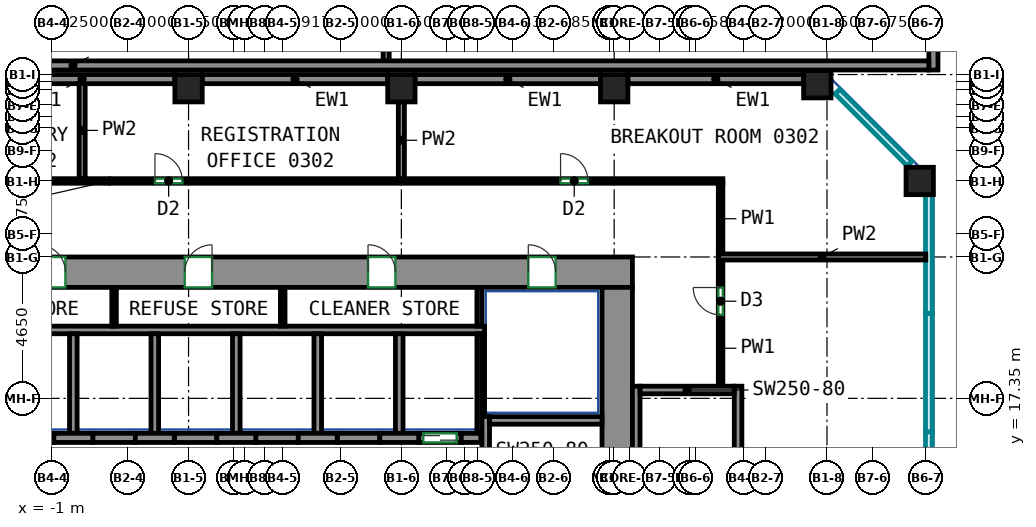
"""IFC4 building model, lengths in metres.
Left out: names, types, materials, properties, quantities, classifications, styles, units other than length and angle.
Written with IfcOpenShell. Run it as: python <this file> out.ifc"""

import sys

from ifc_helpers import new_model, si_unit, direction, frame, frame_2d, origin, origin_2d, place, context, subcontext, project, spatial, rectangle, extrude, source, transform, mapped, element, fill, save


model = new_model("IFC4")
c1 = context("Model", 3, precision=1e-05, world=origin(), true_north=direction((0.0, 1.0)))
c2 = subcontext(c1, "Body", "Model", "MODEL_VIEW")
j1 = project(units=[si_unit("LENGTHUNIT", "METRE"), si_unit("PLANEANGLEUNIT", "RADIAN")], contexts=[c1])
p1 = place(None, origin())
s1 = spatial("IfcSite", under=j1, at=p1, CompositionType="ELEMENT")
p2 = place(p1, origin())
s2 = spatial("IfcBuilding", under=s1, at=p2, CompositionType="ELEMENT")
p3 = place(p2, frame((0.0, 0.0, 18.0)))
s3 = spatial("IfcBuildingStorey", under=s2, at=p3, CompositionType="ELEMENT", Elevation=18.0)
m1 = source(origin(), c2, "Body", "SweptSolid", [
    extrude(rectangle(XDim=0.9, YDim=0.9, at=origin_2d()), origin(), (0.0, 0.0, 1.0), 4.1),
])
for number, where, z_axis, x_axis in (
    (1, (3.5, 27.55, 0.0), (0.0, 0.0, 1.0), (1.0, 0.0, 0.0)),
    (2, (10.5, 27.55, 0.0), (0.0, 0.0, 1.0), (1.0, 0.0, 0.0)),
    (3, (17.5, 27.55, 0.0), (0.0, 0.0, 1.0), (1.0, 0.0, 0.0)),
    (4, (24.182, 27.682, 0.0), (0.0, 0.0, 1.0), (1.0, 0.0, 0.0)),
    (5, (27.55, 24.5, 0.0), (0.0, 0.0, 1.0), (1.0, 0.0, 0.0)),
):
    element("IfcColumn", number, at=place(p3, frame(where, z_axis=z_axis, x_axis=x_axis)), inside=s3, PredefinedType="COLUMN", context=c2, shape_type="MappedRepresentation", body=[
        mapped(m1, transform((0.0, 0.0, 0.0))),
    ])
m2 = source(origin(), c2, "Body", "SweptSolid", [
    extrude(rectangle(XDim=34.1, YDim=1.0, at=frame_2d((17.05, 0.0))), origin(), (0.0, 0.0, 1.0), 4.1),
])
p4 = place(p3, frame((-16.0, 21.5, 0.0), z_axis=(0.0, 0.0, 1.0), x_axis=(1.0, 0.0, 0.0)))
e6 = element("IfcWall", 6, at=p4, inside=s3, PredefinedType="SHEAR", context=c2, shape_type="MappedRepresentation", body=[
    mapped(m2, transform((0.0, 0.0, 0.0))),
])
p5 = place(p4, frame((8.52, 0.0, 0.0)))
e7 = element("IfcOpeningElement", 7, at=p5, cuts=e6, PredefinedType="OPENING", context=c2, shape_type="SweptSolid", body=[
    extrude(rectangle(XDim=0.9, YDim=2.1, at=frame_2d((0.45, 1.05))), frame((0.0, 0.51, 0.0), z_axis=(0.0, -1.0, 0.0), x_axis=(1.0, 0.0, 0.0)), (0.0, 0.0, 1.0), 1.02),
])
p6 = place(p4, frame((14.55, 0.0, 0.0)))
e8 = element("IfcOpeningElement", 8, at=p6, cuts=e6, PredefinedType="OPENING", context=c2, shape_type="SweptSolid", body=[
    extrude(rectangle(XDim=0.9, YDim=2.1, at=frame_2d((0.45, 1.05))), frame((0.0, 0.51, 0.0), z_axis=(0.0, -1.0, 0.0), x_axis=(1.0, 0.0, 0.0)), (0.0, 0.0, 1.0), 1.02),
])
p7 = place(p4, frame((19.374, 0.0, 0.0)))
e9 = element("IfcOpeningElement", 9, at=p7, cuts=e6, PredefinedType="OPENING", context=c2, shape_type="SweptSolid", body=[
    extrude(rectangle(XDim=0.9, YDim=2.1, at=frame_2d((0.45, 1.05))), frame((0.0, 0.51, 0.0), z_axis=(0.0, -1.0, 0.0), x_axis=(1.0, 0.0, 0.0)), (0.0, 0.0, 1.0), 1.02),
])
p8 = place(p4, frame((25.404, 0.0, 0.0)))
e10 = element("IfcOpeningElement", 10, at=p8, cuts=e6, PredefinedType="OPENING", context=c2, shape_type="SweptSolid", body=[
    extrude(rectangle(XDim=0.9, YDim=2.1, at=frame_2d((0.45, 1.05))), frame((0.0, 0.51, 0.0), z_axis=(0.0, -1.0, 0.0), x_axis=(1.0, 0.0, 0.0)), (0.0, 0.0, 1.0), 1.02),
])
p9 = place(p4, frame((2.525, 0.0, 0.0)))
e11 = element("IfcOpeningElement", 11, at=p9, cuts=e6, PredefinedType="OPENING", context=c2, shape_type="SweptSolid", body=[
    extrude(rectangle(XDim=0.9, YDim=2.1, at=frame_2d((0.45, 1.05))), frame((0.0, 0.51, 0.0), z_axis=(0.0, -1.0, 0.0), x_axis=(1.0, 0.0, 0.0)), (0.0, 0.0, 1.0), 1.02),
])
p10 = place(p4, frame((30.675, 0.0, 0.0)))
e12 = element("IfcOpeningElement", 12, at=p10, cuts=e6, PredefinedType="OPENING", context=c2, shape_type="SweptSolid", body=[
    extrude(rectangle(XDim=0.9, YDim=2.1, at=frame_2d((0.45, 1.05))), frame((0.0, 0.51, 0.0), z_axis=(0.0, -1.0, 0.0), x_axis=(1.0, 0.0, 0.0)), (0.0, 0.0, 1.0), 1.02),
])
m3 = source(origin(), c2, "Body", "SweptSolid", [
    extrude(rectangle(XDim=12.0, YDim=1.0, at=frame_2d((6.0, 0.0))), origin(), (0.0, 0.0, 1.0), 4.1),
])
p11 = place(p3, frame((17.6, 9.0, 0.0), z_axis=(0.0, 0.0, 1.0), x_axis=(0.0, 1.0, 0.0)))
e13 = element("IfcWall", 13, at=p11, inside=s3, PredefinedType="SHEAR", context=c2, shape_type="MappedRepresentation", body=[
    mapped(m3, transform((0.0, 0.0, 0.0))),
])
m4 = source(origin(), c2, "Body", "SweptSolid", [
    extrude(rectangle(XDim=7.75, YDim=0.25, at=frame_2d((3.875, 0.0))), origin(), (0.0, 0.0, 1.0), 4.1),
])
p12 = place(p3, frame((13.275, 9.0, 0.0), z_axis=(0.0, 0.0, 1.0), x_axis=(0.0, 1.0, 0.0)))
e14 = element("IfcWall", 14, at=p12, inside=s3, PredefinedType="SHEAR", context=c2, shape_type="MappedRepresentation", body=[
    mapped(m4, transform((0.0, 0.0, 0.0))),
])
m5 = source(origin(), c2, "Body", "SweptSolid", [
    extrude(rectangle(XDim=3.7, YDim=0.25, at=frame_2d((1.85, 0.0))), origin(), (0.0, 0.0, 1.0), 4.1),
])
p13 = place(p3, frame((13.4, 16.625, 0.0), z_axis=(0.0, 0.0, 1.0), x_axis=(1.0, 0.0, 0.0)))
e15 = element("IfcWall", 15, at=p13, inside=s3, PredefinedType="SHEAR", context=c2, shape_type="MappedRepresentation", body=[
    mapped(m5, transform((0.0, 0.0, 0.0))),
])
m6 = source(origin(), c2, "Body", "SweptSolid", [
    extrude(rectangle(XDim=8.0, YDim=0.25, at=frame_2d((4.0, 0.0))), origin(), (0.0, 0.0, 1.0), 4.1),
])
for number, where, z_axis, x_axis in (
    (16, (18.225, 9.75, 0.0), (0.0, 0.0, 1.0), (0.0, 1.0, 0.0)),
    (17, (21.575, 9.75, 0.0), (0.0, 0.0, 1.0), (0.0, 1.0, 0.0)),
):
    element("IfcWall", number, at=place(p3, frame(where, z_axis=z_axis, x_axis=x_axis)), inside=s3, PredefinedType="SHEAR", context=c2, shape_type="MappedRepresentation", body=[
        mapped(m6, transform((0.0, 0.0, 0.0))),
    ])
m7 = source(origin(), c2, "Body", "SweptSolid", [
    extrude(rectangle(XDim=3.1, YDim=0.25, at=frame_2d((1.55, 0.0))), origin(), (0.0, 0.0, 1.0), 4.1),
])
p14 = place(p3, frame((18.35, 17.625, 0.0), z_axis=(0.0, 0.0, 1.0), x_axis=(1.0, 0.0, 0.0)))
e18 = element("IfcWall", 18, at=p14, inside=s3, PredefinedType="SHEAR", context=c2, shape_type="MappedRepresentation", body=[
    mapped(m7, transform((0.0, 0.0, 0.0))),
])
m8 = source(origin(), c2, "Body", "SweptSolid", [
    extrude(rectangle(XDim=1.28, YDim=0.3, at=frame_2d((0.64, 0.0))), origin(), (0.0, 0.0, 1.0), 4.1),
])
for number, where, z_axis, x_axis in (
    (19, (-0.93, 16.05, 0.0), (0.0, 0.0, 1.0), (1.0, 0.0, 0.0)),
    (20, (1.75, 16.05, 0.0), (0.0, 0.0, 1.0), (1.0, 0.0, 0.0)),
    (21, (4.43, 16.05, 0.0), (0.0, 0.0, 1.0), (1.0, 0.0, 0.0)),
):
    element("IfcWall", number, at=place(p3, frame(where, z_axis=z_axis, x_axis=x_axis)), inside=s3, PredefinedType="SHEAR", context=c2, shape_type="MappedRepresentation", body=[
        mapped(m8, transform((0.0, 0.0, 0.0))),
    ])
m9 = source(origin(), c2, "Body", "SweptSolid", [
    extrude(rectangle(XDim=1.28, YDim=0.3, at=frame_2d((0.64, 0.0))), origin(), (0.0, 0.0, 1.0), 4.1),
])
p15 = place(p3, frame((7.11, 16.05, 0.0), z_axis=(0.0, 0.0, 1.0), x_axis=(1.0, 0.0, 0.0)))
e22 = element("IfcWall", 22, at=p15, inside=s3, PredefinedType="SHEAR", context=c2, shape_type="MappedRepresentation", body=[
    mapped(m9, transform((0.0, 0.0, 0.0))),
])
p16 = place(p3, frame((9.79, 16.05, 0.0), z_axis=(0.0, 0.0, 1.0), x_axis=(1.0, 0.0, 0.0)))
e23 = element("IfcWall", 23, at=p16, inside=s3, PredefinedType="SHEAR", context=c2, shape_type="MappedRepresentation", body=[
    mapped(m8, transform((0.0, 0.0, 0.0))),
])
m10 = source(origin(), c2, "Body", "SweptSolid", [
    extrude(rectangle(XDim=0.64, YDim=0.3, at=frame_2d((0.32, 0.0))), origin(), (0.0, 0.0, 1.0), 4.1),
])
p17 = place(p3, frame((12.47, 16.05, 0.0), z_axis=(0.0, 0.0, 1.0), x_axis=(1.0, 0.0, 0.0)))
e24 = element("IfcWall", 24, at=p17, inside=s3, PredefinedType="SHEAR", context=c2, shape_type="MappedRepresentation", body=[
    mapped(m10, transform((0.0, 0.0, 0.0))),
])
m11 = source(origin(), c2, "Body", "SweptSolid", [
    extrude(rectangle(XDim=5.782, YDim=0.3, at=frame_2d((2.891, 0.0))), origin(), (0.0, 0.0, 1.0), 4.1),
])
p18 = place(p3, frame((23.732, 27.85, 0.0), z_axis=(0.0, 0.0, 1.0), x_axis=(-1.0, 0.0, 0.0)))
e25 = element("IfcWall", 25, at=p18, inside=s3, PredefinedType="SOLIDWALL", context=c2, shape_type="MappedRepresentation", body=[
    mapped(m11, transform((0.0, 0.0, 0.0))),
])
m12 = source(origin(), c2, "Body", "SweptSolid", [
    extrude(rectangle(XDim=6.1, YDim=0.3, at=frame_2d((3.05, 0.0))), origin(), (0.0, 0.0, 1.0), 4.1),
])
for number, where, z_axis, x_axis in (
    (26, (17.05, 27.85, 0.0), (0.0, 0.0, 1.0), (-1.0, 0.0, 0.0)),
    (27, (10.05, 27.85, 0.0), (0.0, 0.0, 1.0), (-1.0, 0.0, 0.0)),
    (28, (3.05, 27.85, 0.0), (0.0, 0.0, 1.0), (-1.0, 0.0, 0.0)),
):
    element("IfcWall", number, at=place(p3, frame(where, z_axis=z_axis, x_axis=x_axis)), inside=s3, PredefinedType="SOLIDWALL", context=c2, shape_type="MappedRepresentation", body=[
        mapped(m12, transform((0.0, 0.0, 0.0))),
    ])
m13 = source(origin(), c2, "Body", "SweptSolid", [
    extrude(rectangle(XDim=8.0, YDim=0.3, at=frame_2d((4.0, 0.0))), origin(), (0.0, 0.0, 1.0), 4.1),
])
p19 = place(p3, frame((28.0, 36.15, 0.0), z_axis=(0.0, 0.0, 1.0), x_axis=(0.0, -1.0, 0.0)))
e29 = element("IfcWall", 29, at=p19, inside=s3, PredefinedType="SOLIDWALL", context=c2, shape_type="MappedRepresentation", body=[
    mapped(m13, transform((0.0, 0.0, 0.0))),
])
p20 = place(p19, frame((2.8, 0.0, 0.9)))
e30 = element("IfcOpeningElement", 30, at=p20, cuts=e29, PredefinedType="OPENING", context=c2, shape_type="SweptSolid", body=[
    extrude(rectangle(XDim=2.4, YDim=1.8, at=frame_2d((1.2, 0.9))), frame((0.0, 0.16, 0.0), z_axis=(0.0, -1.0, 0.0), x_axis=(1.0, 0.0, 0.0)), (0.0, 0.0, 1.0), 0.32),
])
m14 = source(origin(), c2, "Body", "SweptSolid", [
    extrude(rectangle(XDim=56.3, YDim=0.3, at=frame_2d((28.15, 0.0))), origin(), (0.0, 0.0, 1.0), 4.1),
])
p21 = place(p3, frame((27.85, 28.3, 0.0), z_axis=(0.0, 0.0, 1.0), x_axis=(-1.0, 0.0, 0.0)))
e31 = element("IfcWall", 31, at=p21, inside=s3, PredefinedType="SOLIDWALL", context=c2, shape_type="MappedRepresentation", body=[
    mapped(m14, transform((0.0, 0.0, 0.0))),
])
m15 = source(origin(), c2, "Body", "SweptSolid", [
    extrude(rectangle(XDim=1.4, YDim=0.3, at=frame_2d((0.7, 0.0))), origin(), (0.0, 0.0, 1.0), 4.1),
])
p22 = place(p3, frame((11.07, 16.05, 0.0), z_axis=(0.0, 0.0, 1.0), x_axis=(1.0, 0.0, 0.0)))
e32 = element("IfcWall", 32, at=p22, inside=s3, PredefinedType="PARTITIONING", context=c2, shape_type="MappedRepresentation", body=[
    mapped(m15, transform((0.0, 0.0, 0.0))),
])
p23 = place(p22, frame((0.15, 0.0, 0.0)))
e33 = element("IfcOpeningElement", 33, at=p23, cuts=e32, PredefinedType="OPENING", context=c2, shape_type="SweptSolid", body=[
    extrude(rectangle(XDim=1.1, YDim=2.1, at=frame_2d((0.55, 1.05))), frame((0.0, 0.16, 0.0), z_axis=(0.0, -1.0, 0.0), x_axis=(1.0, 0.0, 0.0)), (0.0, 0.0, 1.0), 0.32),
])
m16 = source(origin(), c2, "Body", "SweptSolid", [
    extrude(rectangle(XDim=1.4, YDim=0.3, at=frame_2d((0.7, 0.0))), origin(), (0.0, 0.0, 1.0), 4.1),
])
p24 = place(p3, frame((-2.33, 16.05, 0.0), z_axis=(0.0, 0.0, 1.0), x_axis=(1.0, 0.0, 0.0)))
e34 = element("IfcWall", 34, at=p24, inside=s3, PredefinedType="PARTITIONING", context=c2, shape_type="MappedRepresentation", body=[
    mapped(m16, transform((0.0, 0.0, 0.0))),
])
for number, where, z_axis, x_axis in (
    (35, (0.35, 16.05, 0.0), (0.0, 0.0, 1.0), (1.0, 0.0, 0.0)),
    (36, (3.03, 16.05, 0.0), (0.0, 0.0, 1.0), (1.0, 0.0, 0.0)),
):
    element("IfcWall", number, at=place(p3, frame(where, z_axis=z_axis, x_axis=x_axis)), inside=s3, PredefinedType="PARTITIONING", context=c2, shape_type="MappedRepresentation", body=[
        mapped(m15, transform((0.0, 0.0, 0.0))),
    ])
for number, where, z_axis, x_axis in (
    (37, (5.71, 16.05, 0.0), (0.0, 0.0, 1.0), (1.0, 0.0, 0.0)),
    (38, (8.39, 16.05, 0.0), (0.0, 0.0, 1.0), (1.0, 0.0, 0.0)),
):
    element("IfcWall", number, at=place(p3, frame(where, z_axis=z_axis, x_axis=x_axis)), inside=s3, PredefinedType="PARTITIONING", context=c2, shape_type="MappedRepresentation", body=[
        mapped(m16, transform((0.0, 0.0, 0.0))),
    ])
m17 = source(origin(), c2, "Body", "SweptSolid", [
    extrude(rectangle(XDim=24.37, YDim=0.25, at=frame_2d((12.185, 0.0))), origin(), (0.0, 0.0, 1.0), 4.1),
])
p25 = place(p3, frame((-11.135, 19.6, 0.0), z_axis=(0.0, 0.0, 1.0), x_axis=(1.0, 0.0, 0.0)))
e39 = element("IfcWall", 39, at=p25, inside=s3, PredefinedType="PARTITIONING", context=c2, shape_type="MappedRepresentation", body=[
    mapped(m17, transform((0.0, 0.0, 0.0))),
])
m18 = source(origin(), c2, "Body", "SweptSolid", [
    extrude(rectangle(XDim=3.275, YDim=0.165, at=frame_2d((1.638, 0.0))), origin(), (0.0, 0.0, 1.0), 4.1),
])
p26 = place(p3, frame((13.067, 16.2, 0.0), z_axis=(0.0, 0.0, 1.0), x_axis=(0.0, 1.0, 0.0)))
e40 = element("IfcWall", 40, at=p26, inside=s3, PredefinedType="PARTITIONING", context=c2, shape_type="MappedRepresentation", body=[
    mapped(m18, transform((0.0, 0.0, 0.0))),
])
m19 = source(origin(), c2, "Body", "SweptSolid", [
    extrude(rectangle(XDim=1.275, YDim=0.165, at=frame_2d((0.637, 0.0))), origin(), (0.0, 0.0, 1.0), 4.1),
])
p27 = place(p3, frame((13.067, 19.725, 0.0), z_axis=(0.0, 0.0, 1.0), x_axis=(0.0, 1.0, 0.0)))
e41 = element("IfcWall", 41, at=p27, inside=s3, PredefinedType="PARTITIONING", context=c2, shape_type="MappedRepresentation", body=[
    mapped(m19, transform((0.0, 0.0, 0.0))),
])
m20 = source(origin(), c2, "Body", "SweptSolid", [
    extrude(rectangle(XDim=3.275, YDim=0.25, at=frame_2d((1.638, 0.0))), origin(), (0.0, 0.0, 1.0), 4.1),
])
p28 = place(p3, frame((10.43, 16.2, 0.0), z_axis=(0.0, 0.0, 1.0), x_axis=(0.0, 1.0, 0.0)))
e42 = element("IfcWall", 42, at=p28, inside=s3, PredefinedType="PARTITIONING", context=c2, shape_type="MappedRepresentation", body=[
    mapped(m20, transform((0.0, 0.0, 0.0))),
])
m21 = source(origin(), c2, "Body", "SweptSolid", [
    extrude(rectangle(XDim=2.725, YDim=0.085, at=frame_2d((1.363, 0.0))), origin(), (0.0, 0.0, 1.0), 4.1),
])
p29 = place(p3, frame((13.192, 16.75, 0.0), z_axis=(0.0, 0.0, 1.0), x_axis=(0.0, 1.0, 0.0)))
e43 = element("IfcWall", 43, at=p29, inside=s3, PredefinedType="PARTITIONING", context=c2, shape_type="MappedRepresentation", body=[
    mapped(m21, transform((0.0, 0.0, 0.0))),
])
for number, where, z_axis, x_axis in (
    (44, (2.39, 16.2, 0.0), (0.0, 0.0, 1.0), (0.0, 1.0, 0.0)),
    (45, (5.07, 16.2, 0.0), (0.0, 0.0, 1.0), (0.0, 1.0, 0.0)),
    (46, (7.75, 16.2, 0.0), (0.0, 0.0, 1.0), (0.0, 1.0, 0.0)),
    (47, (-0.29, 16.2, 0.0), (0.0, 0.0, 1.0), (0.0, 1.0, 0.0)),
):
    element("IfcWall", number, at=place(p3, frame(where, z_axis=z_axis, x_axis=x_axis)), inside=s3, PredefinedType="PARTITIONING", context=c2, shape_type="MappedRepresentation", body=[
        mapped(m20, transform((0.0, 0.0, 0.0))),
    ])
m22 = source(origin(), c2, "Body", "SweptSolid", [
    extrude(rectangle(XDim=1.275, YDim=0.15, at=frame_2d((0.637, 0.0))), origin(), (0.0, 0.0, 1.0), 4.1),
])
for number, where, z_axis, x_axis in (
    (48, (1.05, 19.725, 0.0), (0.0, 0.0, 1.0), (0.0, 1.0, 0.0)),
    (49, (6.598, 19.725, 0.0), (0.0, 0.0, 1.0), (0.0, 1.0, 0.0)),
):
    element("IfcWall", number, at=place(p3, frame(where, z_axis=z_axis, x_axis=x_axis)), inside=s3, PredefinedType="PARTITIONING", context=c2, shape_type="MappedRepresentation", body=[
        mapped(m22, transform((0.0, 0.0, 0.0))),
    ])
p30 = place(p3, frame((21.0, 17.75, 0.0), z_axis=(0.0, 0.0, 1.0), x_axis=(0.0, 1.0, 0.0)))
e50 = element("IfcWall", 50, at=p30, inside=s3, PredefinedType="PARTITIONING", context=c2, shape_type="SweptSolid", body=[
    extrude(rectangle(XDim=4.16, YDim=0.15, at=frame_2d((2.08, 0.0))), origin(), (0.0, 0.0, 1.0), 4.1),
])
p31 = place(p30, frame((2.345, 0.0, 0.0)))
e51 = element("IfcOpeningElement", 51, at=p31, cuts=e50, PredefinedType="OPENING", context=c2, shape_type="SweptSolid", body=[
    extrude(rectangle(XDim=0.9, YDim=2.1, at=frame_2d((0.45, 1.05))), frame((0.0, 0.085, 0.0), z_axis=(0.0, -1.0, 0.0), x_axis=(1.0, 0.0, 0.0)), (0.0, 0.0, 1.0), 0.17),
])
p32 = place(p3, frame((21.0, 22.09, 0.0), z_axis=(0.0, 0.0, 1.0), x_axis=(0.0, 1.0, 0.0)))
e52 = element("IfcWall", 52, at=p32, inside=s3, PredefinedType="PARTITIONING", context=c2, shape_type="SweptSolid", body=[
    extrude(rectangle(XDim=2.335, YDim=0.15, at=frame_2d((1.167, 0.0))), origin(), (0.0, 0.0, 1.0), 4.1),
])
p33 = place(p3, frame((-19.275, 24.5, 0.0), z_axis=(0.0, 0.0, 1.0), x_axis=(1.0, 0.0, 0.0)))
e53 = element("IfcWall", 53, at=p33, inside=s3, PredefinedType="PARTITIONING", context=c2, shape_type="SweptSolid", body=[
    extrude(rectangle(XDim=40.35, YDim=0.15, at=frame_2d((20.175, 0.0))), origin(), (0.0, 0.0, 1.0), 3.45),
])
p34 = place(p33, frame((9.682, 0.0, 0.0)))
e54 = element("IfcOpeningElement", 54, at=p34, cuts=e53, PredefinedType="OPENING", context=c2, shape_type="SweptSolid", body=[
    extrude(rectangle(XDim=0.9, YDim=2.1, at=frame_2d((0.45, 1.05))), frame((0.0, 0.085, 0.0), z_axis=(0.0, -1.0, 0.0), x_axis=(1.0, 0.0, 0.0)), (0.0, 0.0, 1.0), 0.17),
])
p35 = place(p33, frame((13.569, 0.0, 0.0)))
e55 = element("IfcOpeningElement", 55, at=p35, cuts=e53, PredefinedType="OPENING", context=c2, shape_type="SweptSolid", body=[
    extrude(rectangle(XDim=0.9, YDim=2.1, at=frame_2d((0.45, 1.05))), frame((0.0, 0.085, 0.0), z_axis=(0.0, -1.0, 0.0), x_axis=(1.0, 0.0, 0.0)), (0.0, 0.0, 1.0), 0.17),
])
p36 = place(p33, frame((21.67, 0.0, 0.0)))
e56 = element("IfcOpeningElement", 56, at=p36, cuts=e53, PredefinedType="OPENING", context=c2, shape_type="SweptSolid", body=[
    extrude(rectangle(XDim=0.9, YDim=2.1, at=frame_2d((0.45, 1.05))), frame((0.0, 0.085, 0.0), z_axis=(0.0, -1.0, 0.0), x_axis=(1.0, 0.0, 0.0)), (0.0, 0.0, 1.0), 0.17),
])
p37 = place(p33, frame((35.011, 0.0, 0.0)))
e57 = element("IfcOpeningElement", 57, at=p37, cuts=e53, PredefinedType="OPENING", context=c2, shape_type="SweptSolid", body=[
    extrude(rectangle(XDim=0.9, YDim=2.1, at=frame_2d((0.45, 1.05))), frame((0.0, 0.085, 0.0), z_axis=(0.0, -1.0, 0.0), x_axis=(1.0, 0.0, 0.0)), (0.0, 0.0, 1.0), 0.17),
])
p38 = place(p3, frame((27.75, 22.0, 0.0), z_axis=(0.0, 0.0, 1.0), x_axis=(-1.0, 0.0, 0.0)))
e58 = element("IfcWall", 58, at=p38, inside=s3, PredefinedType="PARTITIONING", context=c2, shape_type="SweptSolid", body=[
    extrude(rectangle(XDim=6.824, YDim=0.2, at=frame_2d((3.412, 0.0))), origin(), (0.0, 0.0, 1.0), 4.1),
])
p39 = place(p3, frame((10.5, 27.1, 0.0), z_axis=(0.0, 0.0, 1.0), x_axis=(0.0, -1.0, 0.0)))
e59 = element("IfcWall", 59, at=p39, inside=s3, PredefinedType="PARTITIONING", context=c2, shape_type="SweptSolid", body=[
    extrude(rectangle(XDim=2.524, YDim=0.2, at=frame_2d((1.262, 0.0))), origin(), (0.0, 0.0, 1.0), 4.1),
])
p40 = place(p3, frame((0.0, 24.576, 0.0), z_axis=(0.0, 0.0, 1.0), x_axis=(0.0, 1.0, 0.0)))
e60 = element("IfcWall", 60, at=p40, inside=s3, PredefinedType="PARTITIONING", context=c2, shape_type="SweptSolid", body=[
    extrude(rectangle(XDim=3.174, YDim=0.2, at=frame_2d((1.587, 0.0))), origin(), (0.0, 0.0, 1.0), 4.1),
])
m23 = source(origin(), c2, "Body", "SweptSolid", [
    extrude(rectangle(XDim=10.1, YDim=0.2, at=frame_2d((5.05, 0.0))), origin(), (0.0, 0.0, 1.0), 3.3),
])
p41 = place(p3, frame((10.0, 38.55, 0.0), z_axis=(0.0, 0.0, 1.0), x_axis=(0.0, -1.0, 0.0)))
e61 = element("IfcWall", 61, at=p41, inside=s3, PredefinedType="PARTITIONING", context=c2, shape_type="MappedRepresentation", body=[
    mapped(m23, transform((0.0, 0.0, 0.0))),
])
p42 = place(p23, origin())
e62 = element("IfcDoor", 62, at=p42, inside=s3, OperationType="DOUBLE_DOOR_SLIDING", PredefinedType="DOOR", context=c2, shape_type="SweptSolid", body=[
    extrude(rectangle(XDim=1.1, YDim=2.1, at=frame_2d((0.55, 1.05))), frame((0.0, 0.025, 0.0), z_axis=(0.0, -1.0, 0.0), x_axis=(1.0, 0.0, 0.0)), (0.0, 0.0, 1.0), 0.05),
])
fill(e33, e62)
p43 = place(p6, origin())
e63 = element("IfcDoor", 63, at=p43, inside=s3, OperationType="SINGLE_SWING_LEFT", PredefinedType="DOOR", context=c2, shape_type="SweptSolid", body=[
    extrude(rectangle(XDim=0.9, YDim=2.1, at=frame_2d((0.45, 1.05))), frame((0.0, -0.355, 0.0), z_axis=(0.0, -1.0, 0.0), x_axis=(1.0, 0.0, 0.0)), (0.0, 0.0, 1.0), 0.05),
])
fill(e8, e63)
p44 = place(p7, origin())
e64 = element("IfcDoor", 64, at=p44, inside=s3, OperationType="SINGLE_SWING_RIGHT", PredefinedType="DOOR", context=c2, shape_type="SweptSolid", body=[
    extrude(rectangle(XDim=0.9, YDim=2.1, at=frame_2d((0.45, 1.05))), frame((0.0, -0.355, 0.0), z_axis=(0.0, -1.0, 0.0), x_axis=(1.0, 0.0, 0.0)), (0.0, 0.0, 1.0), 0.05),
])
fill(e9, e64)
p45 = place(p8, origin())
e65 = element("IfcDoor", 65, at=p45, inside=s3, OperationType="SINGLE_SWING_LEFT", PredefinedType="DOOR", context=c2, shape_type="SweptSolid", body=[
    extrude(rectangle(XDim=0.9, YDim=2.1, at=frame_2d((0.45, 1.05))), frame((0.0, -0.355, 0.0), z_axis=(0.0, -1.0, 0.0), x_axis=(1.0, 0.0, 0.0)), (0.0, 0.0, 1.0), 0.05),
])
fill(e10, e65)
p46 = place(p10, origin())
e66 = element("IfcDoor", 66, at=p46, inside=s3, OperationType="SINGLE_SWING_LEFT", PredefinedType="DOOR", context=c2, shape_type="SweptSolid", body=[
    extrude(rectangle(XDim=0.9, YDim=2.1, at=frame_2d((0.45, 1.05))), frame((0.0, -0.355, 0.0), z_axis=(0.0, -1.0, 0.0), x_axis=(1.0, 0.0, 0.0)), (0.0, 0.0, 1.0), 0.05),
])
fill(e12, e66)
p47 = place(p31, origin())
e67 = element("IfcDoor", 67, at=p47, inside=s3, OperationType="SINGLE_SWING_RIGHT", PredefinedType="DOOR", context=c2, shape_type="SweptSolid", body=[
    extrude(rectangle(XDim=0.9, YDim=2.1, at=frame_2d((0.45, 1.05))), frame((0.0, 0.025, 0.0), z_axis=(0.0, -1.0, 0.0), x_axis=(1.0, 0.0, 0.0)), (0.0, 0.0, 1.0), 0.05),
])
fill(e51, e67)
p48 = place(p36, origin())
e68 = element("IfcDoor", 68, at=p48, inside=s3, OperationType="SINGLE_SWING_LEFT", PredefinedType="DOOR", context=c2, shape_type="SweptSolid", body=[
    extrude(rectangle(XDim=0.9, YDim=2.1, at=frame_2d((0.45, 1.05))), frame((0.0, 0.025, 0.0), z_axis=(0.0, -1.0, 0.0), x_axis=(1.0, 0.0, 0.0)), (0.0, 0.0, 1.0), 0.05),
])
fill(e56, e68)
p49 = place(p37, origin())
e69 = element("IfcDoor", 69, at=p49, inside=s3, OperationType="SINGLE_SWING_LEFT", PredefinedType="DOOR", context=c2, shape_type="SweptSolid", body=[
    extrude(rectangle(XDim=0.9, YDim=2.1, at=frame_2d((0.45, 1.05))), frame((0.0, 0.025, 0.0), z_axis=(0.0, -1.0, 0.0), x_axis=(1.0, 0.0, 0.0)), (0.0, 0.0, 1.0), 0.05),
])
fill(e57, e69)
save(model, sys.argv[1])
